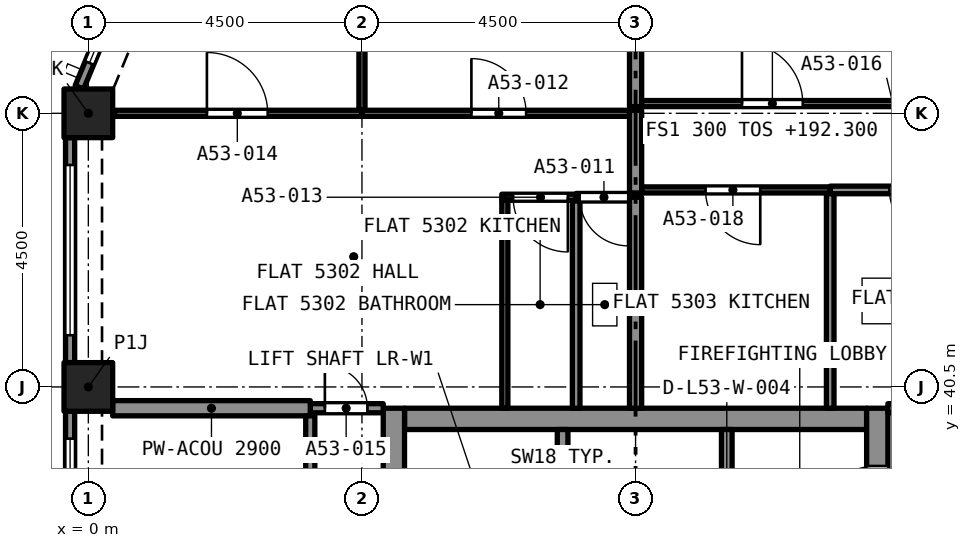
"""IFC4 building model, lengths in metres.
Left out: names, types, materials, properties, quantities, classifications, styles, units other than length and angle.
Written with IfcOpenShell. Run it as: python <this file> out.ifc"""

import sys

from ifc_helpers import new_model, si_unit, direction, frame, frame_2d, origin, origin_2d, place, context, subcontext, project, spatial, rectangle, extrude, element, fill, save


model = new_model("IFC4")
c1 = context("Model", 3, precision=1e-05, world=origin(), true_north=direction((0.0, 1.0)))
c2 = subcontext(c1, "Body", "Model", "MODEL_VIEW")
j1 = project(units=[si_unit("LENGTHUNIT", "METRE"), si_unit("PLANEANGLEUNIT", "RADIAN")], contexts=[c1])
p1 = place(None, origin())
s1 = spatial("IfcSite", under=j1, at=p1, CompositionType="ELEMENT")
p2 = place(p1, origin())
s2 = spatial("IfcBuilding", under=s1, at=p2, CompositionType="ELEMENT")
p3 = place(p2, frame((0.0, 0.0, 192.3)))
s3 = spatial("IfcBuildingStorey", under=s2, at=p3, CompositionType="ELEMENT", Elevation=192.3)
for number, where, z_axis, x_axis in (
    (1, (0.0, 40.5, 0.0), (0.0, 0.0, 1.0), (1.0, 0.0, 0.0)),
    (2, (0.0, 45.0, 0.0), (0.0, 0.0, 1.0), (1.0, 0.0, 0.0)),
):
    element("IfcColumn", number, at=place(p3, frame(where, z_axis=z_axis, x_axis=x_axis)), inside=s3, PredefinedType="COLUMN", context=c2, shape_type="SweptSolid", body=[
        extrude(rectangle(XDim=0.8, YDim=0.8, at=origin_2d()), origin(), (0.0, 0.0, 1.0), 3.2),
    ])
p4 = place(p3, frame((5.2, 39.975, 0.0), z_axis=(0.0, 0.0, 1.0), x_axis=(1.0, 0.0, 0.0)))
e3 = element("IfcWall", 3, at=p4, inside=s3, PredefinedType="SOLIDWALL", context=c2, shape_type="SweptSolid", body=[
    extrude(rectangle(XDim=7.6, YDim=0.35, at=frame_2d((3.8, 0.0))), origin(), (0.0, 0.0, 1.0), 3.2),
])
p5 = place(p3, frame((5.025, 27.35, 0.0), z_axis=(0.0, 0.0, 1.0), x_axis=(0.0, 1.0, 0.0)))
e4 = element("IfcWall", 4, at=p5, inside=s3, PredefinedType="SOLIDWALL", context=c2, shape_type="SweptSolid", body=[
    extrude(rectangle(XDim=12.8, YDim=0.35, at=frame_2d((6.4, 0.0))), origin(), (0.0, 0.0, 1.0), 3.2),
])
p6 = place(p5, frame((8.6, 0.0, 0.0)))
e5 = element("IfcOpeningElement", 5, at=p6, cuts=e4, PredefinedType="OPENING", context=c2, shape_type="SweptSolid", body=[
    extrude(rectangle(XDim=1.2, YDim=2.1, at=frame_2d((0.6, 1.05))), frame((0.0, 0.185, 0.0), z_axis=(0.0, -1.0, 0.0), x_axis=(1.0, 0.0, 0.0)), (0.0, 0.0, 1.0), 0.37),
])
p7 = place(p3, frame((12.975, 27.35, 0.0), z_axis=(0.0, 0.0, 1.0), x_axis=(0.0, 1.0, 0.0)))
e6 = element("IfcWall", 6, at=p7, inside=s3, PredefinedType="SOLIDWALL", context=c2, shape_type="SweptSolid", body=[
    extrude(rectangle(XDim=12.8, YDim=0.35, at=frame_2d((6.4, 0.0))), origin(), (0.0, 0.0, 1.0), 3.2),
])
p8 = place(p7, frame((10.75, 0.0, 0.0)))
e7 = element("IfcOpeningElement", 7, at=p8, cuts=e6, PredefinedType="OPENING", context=c2, shape_type="SweptSolid", body=[
    extrude(rectangle(XDim=1.1, YDim=2.1, at=frame_2d((0.55, 1.05))), frame((0.0, 0.185, 0.0), z_axis=(0.0, -1.0, 0.0), x_axis=(1.0, 0.0, 0.0)), (0.0, 0.0, 1.0), 0.37),
])
p9 = place(p7, frame((8.6, 0.0, 0.0)))
e8 = element("IfcOpeningElement", 8, at=p9, cuts=e6, PredefinedType="OPENING", context=c2, shape_type="SweptSolid", body=[
    extrude(rectangle(XDim=1.2, YDim=2.1, at=frame_2d((0.6, 1.05))), frame((0.0, 0.185, 0.0), z_axis=(0.0, -1.0, 0.0), x_axis=(1.0, 0.0, 0.0)), (0.0, 0.0, 1.0), 0.37),
])
p10 = place(p3, frame((-0.147, 45.429, 0.0), z_axis=(0.0, 0.0, 1.0), x_axis=(0.382669406082, 0.923885342263, 0.0)))
e9 = element("IfcWall", 9, at=p10, inside=s3, PredefinedType="SOLIDWALL", context=c2, shape_type="SweptSolid", body=[
    extrude(rectangle(XDim=2.602, YDim=0.15, at=frame_2d((1.301, 0.0))), origin(), (0.0, 0.0, 1.0), 3.2),
])
p11 = place(p10, frame((0.432, 0.0, 0.45)))
e10 = element("IfcOpeningElement", 10, at=p11, cuts=e9, PredefinedType="OPENING", context=c2, shape_type="SweptSolid", body=[
    extrude(rectangle(XDim=1.9, YDim=1.95, at=frame_2d((0.95, 0.975))), frame((0.0, 0.085, 0.0), z_axis=(0.0, -1.0, 0.0), x_axis=(1.0, 0.0, 0.0)), (0.0, 0.0, 1.0), 0.17),
])
p12 = place(p3, frame((-0.3, 40.9, 0.0), z_axis=(0.0, 0.0, 1.0), x_axis=(0.0, 1.0, 0.0)))
e11 = element("IfcWall", 11, at=p12, inside=s3, PredefinedType="SOLIDWALL", context=c2, shape_type="SweptSolid", body=[
    extrude(rectangle(XDim=3.7, YDim=0.15, at=frame_2d((1.85, 0.0))), origin(), (0.0, 0.0, 1.0), 3.2),
])
p13 = place(p12, frame((0.45, 0.0, 0.45)))
e12 = element("IfcOpeningElement", 12, at=p13, cuts=e11, PredefinedType="OPENING", context=c2, shape_type="SweptSolid", body=[
    extrude(rectangle(XDim=2.8, YDim=1.95, at=frame_2d((1.4, 0.975))), frame((0.0, 0.085, 0.0), z_axis=(0.0, -1.0, 0.0), x_axis=(1.0, 0.0, 0.0)), (0.0, 0.0, 1.0), 0.17),
])
p14 = place(p3, frame((-0.3, 36.4, 0.0), z_axis=(0.0, 0.0, 1.0), x_axis=(0.0, 1.0, 0.0)))
e13 = element("IfcWall", 13, at=p14, inside=s3, PredefinedType="SOLIDWALL", context=c2, shape_type="SweptSolid", body=[
    extrude(rectangle(XDim=3.7, YDim=0.15, at=frame_2d((1.85, 0.0))), origin(), (0.0, 0.0, 1.0), 3.2),
])
p15 = place(p14, frame((0.45, 0.0, 0.45)))
e14 = element("IfcOpeningElement", 14, at=p15, cuts=e13, PredefinedType="OPENING", context=c2, shape_type="SweptSolid", body=[
    extrude(rectangle(XDim=2.8, YDim=1.95, at=frame_2d((1.4, 0.975))), frame((0.0, 0.085, 0.0), z_axis=(0.0, -1.0, 0.0), x_axis=(1.0, 0.0, 0.0)), (0.0, 0.0, 1.0), 0.17),
])
p16 = place(p3, frame((9.0, 43.62, 0.0), z_axis=(0.0, 0.0, 1.0), x_axis=(-1.0, 0.0, 0.0)))
e15 = element("IfcWall", 15, at=p16, inside=s3, PredefinedType="PARTITIONING", context=c2, shape_type="SweptSolid", body=[
    extrude(rectangle(XDim=0.977, YDim=0.125, at=frame_2d((0.489, 0.0))), origin(), (0.0, 0.0, 1.0), 2.9),
])
p17 = place(p16, frame((0.12, 0.0, 0.0)))
e16 = element("IfcOpeningElement", 16, at=p17, cuts=e15, PredefinedType="OPENING", context=c2, shape_type="SweptSolid", body=[
    extrude(rectangle(XDim=0.8, YDim=2.1, at=frame_2d((0.4, 1.05))), frame((0.0, 0.073, 0.0), z_axis=(0.0, -1.0, 0.0), x_axis=(1.0, 0.0, 0.0)), (0.0, 0.0, 1.0), 0.145),
])
p18 = place(p3, frame((8.023, 40.15, 0.0), z_axis=(0.0, 0.0, 1.0), x_axis=(0.0, 1.0, 0.0)))
e17 = element("IfcWall", 17, at=p18, inside=s3, PredefinedType="PARTITIONING", context=c2, shape_type="SweptSolid", body=[
    extrude(rectangle(XDim=3.408, YDim=0.125, at=frame_2d((1.704, 0.0))), origin(), (0.0, 0.0, 1.0), 2.9),
])
p19 = place(p3, frame((9.0, 40.15, 0.0), z_axis=(0.0, 0.0, 1.0), x_axis=(0.0, 1.0, 0.0)))
e18 = element("IfcWall", 18, at=p19, inside=s3, PredefinedType="PARTITIONING", context=c2, shape_type="SweptSolid", body=[
    extrude(rectangle(XDim=3.47, YDim=0.2, at=frame_2d((1.735, 0.0))), origin(), (0.0, 0.0, 1.0), 2.9),
])
p20 = place(p3, frame((4.5, 45.0, 0.0), z_axis=(0.0, 0.0, 1.0), x_axis=(1.0, 0.0, 0.0)))
e19 = element("IfcWall", 19, at=p20, inside=s3, PredefinedType="PARTITIONING", context=c2, shape_type="SweptSolid", body=[
    extrude(rectangle(XDim=4.4, YDim=0.1, at=frame_2d((2.2, 0.0))), origin(), (0.0, 0.0, 1.0), 2.9),
])
p21 = place(p20, frame((1.8, 0.0, 0.0)))
e20 = element("IfcOpeningElement", 20, at=p21, cuts=e19, PredefinedType="OPENING", context=c2, shape_type="SweptSolid", body=[
    extrude(rectangle(XDim=0.9, YDim=2.1, at=frame_2d((0.45, 1.05))), frame((0.0, 0.06, 0.0), z_axis=(0.0, -1.0, 0.0), x_axis=(1.0, 0.0, 0.0)), (0.0, 0.0, 1.0), 0.12),
])
p22 = place(p3, frame((4.5, 45.05, 0.0), z_axis=(0.0, 0.0, 1.0), x_axis=(0.0, 1.0, 0.0)))
e21 = element("IfcWall", 21, at=p22, inside=s3, PredefinedType="PARTITIONING", context=c2, shape_type="SweptSolid", body=[
    extrude(rectangle(XDim=4.017, YDim=0.1, at=frame_2d((2.009, 0.0))), origin(), (0.0, 0.0, 1.0), 2.9),
])
p23 = place(p3, frame((9.0, 45.11, 0.0), z_axis=(0.0, 0.0, 1.0), x_axis=(0.0, 1.0, 0.0)))
e22 = element("IfcWall", 22, at=p23, inside=s3, PredefinedType="PARTITIONING", context=c2, shape_type="SweptSolid", body=[
    extrude(rectangle(XDim=3.99, YDim=0.2, at=frame_2d((1.995, 0.0))), origin(), (0.0, 0.0, 1.0), 2.9),
])
p24 = place(p3, frame((8.023, 43.62, 0.0), z_axis=(0.0, 0.0, 1.0), x_axis=(-1.0, 0.0, 0.0)))
e23 = element("IfcWall", 23, at=p24, inside=s3, PredefinedType="PARTITIONING", context=c2, shape_type="SweptSolid", body=[
    extrude(rectangle(XDim=1.223, YDim=0.1, at=frame_2d((0.611, 0.0))), origin(), (0.0, 0.0, 1.0), 2.9),
])
p25 = place(p24, frame((0.136, 0.0, 0.0)))
e24 = element("IfcOpeningElement", 24, at=p25, cuts=e23, PredefinedType="OPENING", context=c2, shape_type="SweptSolid", body=[
    extrude(rectangle(XDim=0.9, YDim=2.1, at=frame_2d((0.45, 1.05))), frame((0.0, 0.06, 0.0), z_axis=(0.0, -1.0, 0.0), x_axis=(1.0, 0.0, 0.0)), (0.0, 0.0, 1.0), 0.12),
])
p26 = place(p3, frame((6.85, 40.15, 0.0), z_axis=(0.0, 0.0, 1.0), x_axis=(0.0, 1.0, 0.0)))
e25 = element("IfcWall", 25, at=p26, inside=s3, PredefinedType="PARTITIONING", context=c2, shape_type="SweptSolid", body=[
    extrude(rectangle(XDim=3.42, YDim=0.1, at=frame_2d((1.71, 0.0))), origin(), (0.0, 0.0, 1.0), 2.9),
])
p27 = place(p3, frame((0.433, 45.0, 0.0), z_axis=(0.0, 0.0, 1.0), x_axis=(1.0, 0.0, 0.0)))
e26 = element("IfcWall", 26, at=p27, inside=s3, PredefinedType="PARTITIONING", context=c2, shape_type="SweptSolid", body=[
    extrude(rectangle(XDim=4.067, YDim=0.1, at=frame_2d((2.034, 0.0))), origin(), (0.0, 0.0, 1.0), 2.9),
])
p28 = place(p27, frame((1.517, 0.0, 0.0)))
e27 = element("IfcOpeningElement", 27, at=p28, cuts=e26, PredefinedType="OPENING", context=c2, shape_type="SweptSolid", body=[
    extrude(rectangle(XDim=1.0, YDim=2.1, at=frame_2d((0.5, 1.05))), frame((0.0, 0.06, 0.0), z_axis=(0.0, -1.0, 0.0), x_axis=(1.0, 0.0, 0.0)), (0.0, 0.0, 1.0), 0.12),
])
p29 = place(p3, frame((9.0, 43.69, 0.0), z_axis=(0.0, 0.0, 1.0), x_axis=(0.0, 1.0, 0.0)))
e28 = element("IfcWall", 28, at=p29, inside=s3, PredefinedType="PARTITIONING", context=c2, shape_type="SweptSolid", body=[
    extrude(rectangle(XDim=1.36, YDim=0.2, at=frame_2d((0.68, 0.0))), origin(), (0.0, 0.0, 1.0), 2.9),
])
p30 = place(p3, frame((3.65, 40.15, 0.0), z_axis=(0.0, 0.0, 1.0), x_axis=(1.0, 0.0, 0.0)))
e29 = element("IfcWall", 29, at=p30, inside=s3, PredefinedType="PARTITIONING", context=c2, shape_type="SweptSolid", body=[
    extrude(rectangle(XDim=1.2, YDim=0.15, at=frame_2d((0.6, 0.0))), origin(), (0.0, 0.0, 1.0), 2.9),
])
p31 = place(p30, frame((0.24, 0.0, 0.0)))
e30 = element("IfcOpeningElement", 30, at=p31, cuts=e29, PredefinedType="OPENING", context=c2, shape_type="SweptSolid", body=[
    extrude(rectangle(XDim=0.7, YDim=2.1, at=frame_2d((0.35, 1.05))), frame((0.0, 0.085, 0.0), z_axis=(0.0, -1.0, 0.0), x_axis=(1.0, 0.0, 0.0)), (0.0, 0.0, 1.0), 0.17),
])
p32 = place(p3, frame((0.4, 40.15, 0.0), z_axis=(0.0, 0.0, 1.0), x_axis=(1.0, 0.0, 0.0)))
e31 = element("IfcWall", 31, at=p32, inside=s3, PredefinedType="PARTITIONING", context=c2, shape_type="SweptSolid", body=[
    extrude(rectangle(XDim=3.25, YDim=0.25, at=frame_2d((1.625, 0.0))), origin(), (0.0, 0.0, 1.0), 2.9),
])
p33 = place(p3, frame((15.012, 43.74, 0.0), z_axis=(0.0, 0.0, 1.0), x_axis=(-1.0, 0.0, 0.0)))
e32 = element("IfcWall", 32, at=p33, inside=s3, PredefinedType="PARTITIONING", context=c2, shape_type="SweptSolid", body=[
    extrude(rectangle(XDim=2.812, YDim=0.125, at=frame_2d((1.406, 0.0))), origin(), (0.0, 0.0, 1.0), 2.9),
])
p34 = place(p33, frame((1.037, 0.0, 0.0)))
e33 = element("IfcOpeningElement", 33, at=p34, cuts=e32, PredefinedType="OPENING", context=c2, shape_type="SweptSolid", body=[
    extrude(rectangle(XDim=0.8, YDim=2.1, at=frame_2d((0.4, 1.05))), frame((0.0, 0.073, 0.0), z_axis=(0.0, -1.0, 0.0), x_axis=(1.0, 0.0, 0.0)), (0.0, 0.0, 1.0), 0.145),
])
p35 = place(p3, frame((12.201, 40.15, 0.0), z_axis=(0.0, 0.0, 1.0), x_axis=(0.0, 1.0, 0.0)))
e34 = element("IfcWall", 34, at=p35, inside=s3, PredefinedType="PARTITIONING", context=c2, shape_type="SweptSolid", body=[
    extrude(rectangle(XDim=3.528, YDim=0.125, at=frame_2d((1.764, 0.0))), origin(), (0.0, 0.0, 1.0), 2.9),
])
p36 = place(p3, frame((13.15, 40.15, 0.0), z_axis=(0.0, 0.0, 1.0), x_axis=(1.0, 0.0, 0.0)))
e35 = element("IfcWall", 35, at=p36, inside=s3, PredefinedType="PARTITIONING", context=c2, shape_type="SweptSolid", body=[
    extrude(rectangle(XDim=1.8, YDim=0.15, at=frame_2d((0.9, 0.0))), origin(), (0.0, 0.0, 1.0), 2.9),
])
p37 = place(p3, frame((12.201, 43.74, 0.0), z_axis=(0.0, 0.0, 1.0), x_axis=(-1.0, 0.0, 0.0)))
e36 = element("IfcWall", 36, at=p37, inside=s3, PredefinedType="PARTITIONING", context=c2, shape_type="SweptSolid", body=[
    extrude(rectangle(XDim=3.101, YDim=0.1, at=frame_2d((1.55, 0.0))), origin(), (0.0, 0.0, 1.0), 2.9),
])
p38 = place(p37, frame((1.15, 0.0, 0.0)))
e37 = element("IfcOpeningElement", 37, at=p38, cuts=e36, PredefinedType="OPENING", context=c2, shape_type="SweptSolid", body=[
    extrude(rectangle(XDim=0.9, YDim=2.1, at=frame_2d((0.45, 1.05))), frame((0.0, 0.06, 0.0), z_axis=(0.0, -1.0, 0.0), x_axis=(1.0, 0.0, 0.0)), (0.0, 0.0, 1.0), 0.12),
])
p39 = place(p3, frame((9.1, 45.16, 0.0), z_axis=(0.0, 0.0, 1.0), x_axis=(1.0, 0.0, 0.0)))
e38 = element("IfcWall", 38, at=p39, inside=s3, PredefinedType="PARTITIONING", context=c2, shape_type="SweptSolid", body=[
    extrude(rectangle(XDim=4.4, YDim=0.1, at=frame_2d((2.2, 0.0))), origin(), (0.0, 0.0, 1.0), 2.9),
])
p40 = place(p39, frame((1.65, 0.0, 0.0)))
e39 = element("IfcOpeningElement", 39, at=p40, cuts=e38, PredefinedType="OPENING", context=c2, shape_type="SweptSolid", body=[
    extrude(rectangle(XDim=1.0, YDim=2.1, at=frame_2d((0.5, 1.05))), frame((0.0, 0.06, 0.0), z_axis=(0.0, -1.0, 0.0), x_axis=(1.0, 0.0, 0.0)), (0.0, 0.0, 1.0), 0.12),
])
p41 = place(p3, frame((3.65, 36.0, 0.0), z_axis=(0.0, 0.0, 1.0), x_axis=(0.0, 1.0, 0.0)))
e40 = element("IfcWall", 40, at=p41, inside=s3, PredefinedType="PARTITIONING", context=c2, shape_type="SweptSolid", body=[
    extrude(rectangle(XDim=4.025, YDim=0.15, at=frame_2d((2.012, 0.0))), origin(), (0.0, 0.0, 1.0), 2.9),
])
p42 = place(p41, frame((1.575, 0.0, 0.0)))
e41 = element("IfcOpeningElement", 41, at=p42, cuts=e40, PredefinedType="OPENING", context=c2, shape_type="SweptSolid", body=[
    extrude(rectangle(XDim=1.0, YDim=2.1, at=frame_2d((0.5, 1.05))), frame((0.0, 0.085, 0.0), z_axis=(0.0, -1.0, 0.0), x_axis=(1.0, 0.0, 0.0)), (0.0, 0.0, 1.0), 0.17),
])
p43 = place(p3, frame((7.8, 37.5, 0.0), z_axis=(0.0, 0.0, 1.0), x_axis=(0.0, 1.0, 0.0)))
e42 = element("IfcWall", 42, at=p43, inside=s3, PredefinedType="SOLIDWALL", context=c2, shape_type="SweptSolid", body=[
    extrude(rectangle(XDim=2.3, YDim=0.175, at=frame_2d((1.15, 0.0))), origin(), (0.0, 0.0, 1.0), 2.9),
])
p44 = place(p3, frame((10.5, 37.5, 0.0), z_axis=(0.0, 0.0, 1.0), x_axis=(0.0, 1.0, 0.0)))
e43 = element("IfcWall", 43, at=p44, inside=s3, PredefinedType="SOLIDWALL", context=c2, shape_type="SweptSolid", body=[
    extrude(rectangle(XDim=2.3, YDim=0.175, at=frame_2d((1.15, 0.0))), origin(), (0.0, 0.0, 1.0), 2.9),
])
p45 = place(p44, frame((0.65, 0.0, 0.0)))
e44 = element("IfcOpeningElement", 44, at=p45, cuts=e43, PredefinedType="OPENING", context=c2, shape_type="SweptSolid", body=[
    extrude(rectangle(XDim=1.0, YDim=2.1, at=frame_2d((0.5, 1.05))), frame((0.0, 0.097, 0.0), z_axis=(0.0, -1.0, 0.0), x_axis=(1.0, 0.0, 0.0)), (0.0, 0.0, 1.0), 0.195),
])
p46 = place(p11, origin())
e45 = element("IfcWindow", 45, at=p46, inside=s3, PartitioningType="SINGLE_PANEL", PredefinedType="WINDOW", context=c2, shape_type="SweptSolid", body=[
    extrude(rectangle(XDim=1.9, YDim=1.95, at=frame_2d((0.95, 0.975))), frame((0.0, 0.03, 0.0), z_axis=(0.0, -1.0, 0.0), x_axis=(1.0, 0.0, 0.0)), (0.0, 0.0, 1.0), 0.06),
])
fill(e10, e45)
p47 = place(p13, origin())
e46 = element("IfcWindow", 46, at=p47, inside=s3, PartitioningType="SINGLE_PANEL", PredefinedType="WINDOW", context=c2, shape_type="SweptSolid", body=[
    extrude(rectangle(XDim=2.8, YDim=1.95, at=frame_2d((1.4, 0.975))), frame((0.0, 0.03, 0.0), z_axis=(0.0, -1.0, 0.0), x_axis=(1.0, 0.0, 0.0)), (0.0, 0.0, 1.0), 0.06),
])
fill(e12, e46)
p48 = place(p15, origin())
e47 = element("IfcWindow", 47, at=p48, inside=s3, PartitioningType="SINGLE_PANEL", PredefinedType="WINDOW", context=c2, shape_type="SweptSolid", body=[
    extrude(rectangle(XDim=2.8, YDim=1.95, at=frame_2d((1.4, 0.975))), frame((0.0, 0.03, 0.0), z_axis=(0.0, -1.0, 0.0), x_axis=(1.0, 0.0, 0.0)), (0.0, 0.0, 1.0), 0.06),
])
fill(e14, e47)
p49 = place(p17, origin())
e48 = element("IfcDoor", 48, at=p49, inside=s3, OperationType="SINGLE_SWING_LEFT", PredefinedType="DOOR", context=c2, shape_type="SweptSolid", body=[
    extrude(rectangle(XDim=0.8, YDim=2.1, at=frame_2d((0.4, 1.05))), frame((0.0, 0.025, 0.0), z_axis=(0.0, -1.0, 0.0), x_axis=(1.0, 0.0, 0.0)), (0.0, 0.0, 1.0), 0.05),
])
fill(e16, e48)
p50 = place(p21, origin())
e49 = element("IfcDoor", 49, at=p50, inside=s3, OperationType="SINGLE_SWING_RIGHT", PredefinedType="DOOR", context=c2, shape_type="SweptSolid", body=[
    extrude(rectangle(XDim=0.9, YDim=2.1, at=frame_2d((0.45, 1.05))), frame((0.0, 0.025, 0.0), z_axis=(0.0, -1.0, 0.0), x_axis=(1.0, 0.0, 0.0)), (0.0, 0.0, 1.0), 0.05),
])
fill(e20, e49)
p51 = place(p25, origin())
e50 = element("IfcDoor", 50, at=p51, inside=s3, OperationType="SINGLE_SWING_LEFT", PredefinedType="DOOR", context=c2, shape_type="SweptSolid", body=[
    extrude(rectangle(XDim=0.9, YDim=2.1, at=frame_2d((0.45, 1.05))), frame((0.0, 0.025, 0.0), z_axis=(0.0, -1.0, 0.0), x_axis=(1.0, 0.0, 0.0)), (0.0, 0.0, 1.0), 0.05),
])
fill(e24, e50)
p52 = place(p28, origin())
e51 = element("IfcDoor", 51, at=p52, inside=s3, OperationType="SINGLE_SWING_LEFT", PredefinedType="DOOR", context=c2, shape_type="SweptSolid", body=[
    extrude(rectangle(XDim=1.0, YDim=2.1, at=frame_2d((0.5, 1.05))), frame((0.0, 0.025, 0.0), z_axis=(0.0, -1.0, 0.0), x_axis=(1.0, 0.0, 0.0)), (0.0, 0.0, 1.0), 0.05),
])
fill(e27, e51)
p53 = place(p31, origin())
e52 = element("IfcDoor", 52, at=p53, inside=s3, OperationType="SINGLE_SWING_LEFT", PredefinedType="DOOR", context=c2, shape_type="SweptSolid", body=[
    extrude(rectangle(XDim=0.7, YDim=2.1, at=frame_2d((0.35, 1.05))), frame((0.0, 0.025, 0.0), z_axis=(0.0, -1.0, 0.0), x_axis=(1.0, 0.0, 0.0)), (0.0, 0.0, 1.0), 0.05),
])
fill(e30, e52)
p54 = place(p34, origin())
e53 = element("IfcDoor", 53, at=p54, inside=s3, OperationType="SINGLE_SWING_RIGHT", PredefinedType="DOOR", context=c2, shape_type="SweptSolid", body=[
    extrude(rectangle(XDim=0.8, YDim=2.1, at=frame_2d((0.4, 1.05))), frame((0.0, 0.025, 0.0), z_axis=(0.0, -1.0, 0.0), x_axis=(1.0, 0.0, 0.0)), (0.0, 0.0, 1.0), 0.05),
])
fill(e33, e53)
p55 = place(p38, origin())
e54 = element("IfcDoor", 54, at=p55, inside=s3, OperationType="SINGLE_SWING_RIGHT", PredefinedType="DOOR", context=c2, shape_type="SweptSolid", body=[
    extrude(rectangle(XDim=0.9, YDim=2.1, at=frame_2d((0.45, 1.05))), frame((0.0, 0.025, 0.0), z_axis=(0.0, -1.0, 0.0), x_axis=(1.0, 0.0, 0.0)), (0.0, 0.0, 1.0), 0.05),
])
fill(e37, e54)
p56 = place(p40, origin())
e55 = element("IfcDoor", 55, at=p56, inside=s3, OperationType="SINGLE_SWING_LEFT", PredefinedType="DOOR", context=c2, shape_type="SweptSolid", body=[
    extrude(rectangle(XDim=1.0, YDim=2.1, at=frame_2d((0.5, 1.05))), frame((0.0, 0.025, 0.0), z_axis=(0.0, -1.0, 0.0), x_axis=(1.0, 0.0, 0.0)), (0.0, 0.0, 1.0), 0.05),
])
fill(e39, e55)
p57 = place(p8, origin())
e56 = element("IfcDoor", 56, at=p57, inside=s3, OperationType="SINGLE_SWING_LEFT", PredefinedType="DOOR", context=c2, shape_type="SweptSolid", body=[
    extrude(rectangle(XDim=1.1, YDim=2.1, at=frame_2d((0.55, 1.05))), frame((0.0, 0.025, 0.0), z_axis=(0.0, -1.0, 0.0), x_axis=(1.0, 0.0, 0.0)), (0.0, 0.0, 1.0), 0.05),
])
fill(e7, e56)
save(model, sys.argv[1])
